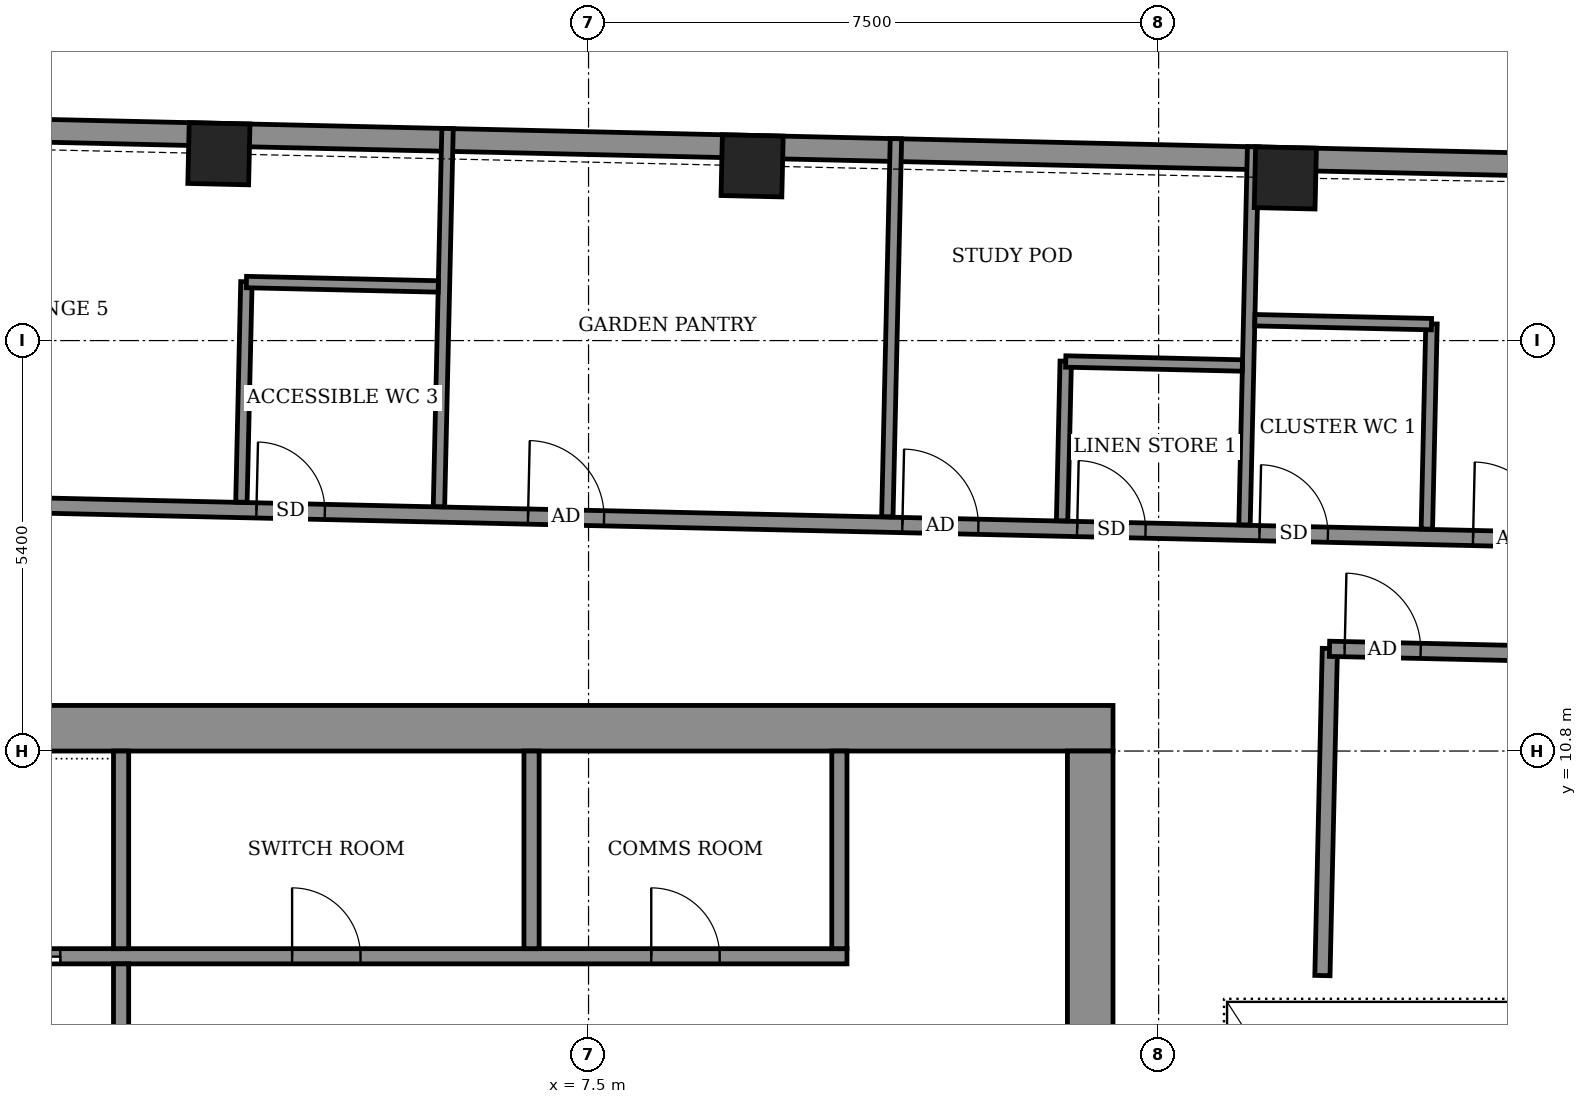
"""IFC4 building model, lengths in metres.
Left out: names, types, materials, properties, quantities, classifications, styles, units other than length and angle.
Written with IfcOpenShell. Run it as: python <this file> out.ifc"""

import sys

from ifc_helpers import new_model, si_unit, direction, frame, frame_2d, origin, origin_2d, place, context, subcontext, project, spatial, rectangle, extrude, element, fill, save


model = new_model("IFC4")
c1 = context("Model", 3, precision=1e-05, world=origin(), true_north=direction((0.0, 1.0)))
c2 = subcontext(c1, "Body", "Model", "MODEL_VIEW")
j1 = project(units=[si_unit("LENGTHUNIT", "METRE"), si_unit("PLANEANGLEUNIT", "RADIAN")], contexts=[c1])
p1 = place(None, origin())
s1 = spatial("IfcSite", under=j1, at=p1, CompositionType="ELEMENT")
p2 = place(p1, origin())
s2 = spatial("IfcBuilding", under=s1, at=p2, CompositionType="ELEMENT")
p3 = place(p2, frame((0.0, 0.0, 350.7)))
s3 = spatial("IfcBuildingStorey", under=s2, at=p3, CompositionType="ELEMENT", Elevation=350.7)
for number, where, z_axis, x_axis in (
    (1, (16.667, 18.34, -0.55), (0.0, 0.0, 1.0), (-1.0, 0.023, 0.0)),
    (2, (9.652, 18.499, -0.55), (0.0, 0.0, 1.0), (-1.0, 0.023, 0.0)),
    (3, (2.637, 18.658, -0.55), (0.0, 0.0, 1.0), (-1.0, 0.023, 0.0)),
):
    element("IfcColumn", number, at=place(p3, frame(where, z_axis=z_axis, x_axis=x_axis)), inside=s3, PredefinedType="COLUMN", context=c2, shape_type="SweptSolid", body=[
        extrude(rectangle(XDim=0.8, YDim=0.8, at=origin_2d()), origin(), (0.0, 0.0, 1.0), 3.6),
    ])
p4 = place(p3, frame((23.537, 18.434, 0.0), z_axis=(0.0, 0.0, 1.0), x_axis=(-0.999742787513, 0.022679480066, 0.0)))
e4 = element("IfcWall", 4, at=p4, inside=s3, PredefinedType="SOLIDWALL", context=c2, shape_type="SweptSolid", body=[
    extrude(rectangle(XDim=41.8, YDim=0.3, at=frame_2d((20.9, 0.0))), origin(), (0.0, 0.0, 1.0), 2.5),
])
p5 = place(p3, frame((17.155, 7.846, 0.0), z_axis=(0.0, 0.0, 1.0), x_axis=(0.022745886685, 0.999741278851, 0.0)))
e5 = element("IfcWall", 5, at=p5, inside=s3, PredefinedType="PARTITIONING", context=c2, shape_type="SweptSolid", body=[
    extrude(rectangle(XDim=4.304, YDim=0.2, at=frame_2d((2.152, 0.0))), origin(), (0.0, 0.0, 1.0), 3.05),
])
p6 = place(p3, frame((17.248, 12.145, 0.0), z_axis=(0.0, 0.0, 1.0), x_axis=(0.999740905536, -0.022762288964, 0.0)))
e6 = element("IfcWall", 6, at=p6, inside=s3, PredefinedType="PARTITIONING", context=c2, shape_type="SweptSolid", body=[
    extrude(rectangle(XDim=4.612, YDim=0.2, at=frame_2d((2.306, 0.0))), origin(), (0.0, 0.0, 1.0), 3.05),
])
p7 = place(p6, frame((0.2, 0.0, 0.0)))
e7 = element("IfcOpeningElement", 7, at=p7, cuts=e6, PredefinedType="OPENING", context=c2, shape_type="SweptSolid", body=[
    extrude(rectangle(XDim=1.0, YDim=2.1, at=frame_2d((0.5, 1.05))), frame((0.0, 0.11, 0.0), z_axis=(0.0, -1.0, 0.0), x_axis=(1.0, 0.0, 0.0)), (0.0, 0.0, 1.0), 0.22),
])
p8 = place(p3, frame((-16.831, 14.419, 0.0), z_axis=(0.0, 0.0, 1.0), x_axis=(0.999742531431, -0.022690765715, 0.0)))
e8 = element("IfcWall", 8, at=p8, inside=s3, PredefinedType="PARTITIONING", context=c2, shape_type="SweptSolid", body=[
    extrude(rectangle(XDim=38.734, YDim=0.2, at=frame_2d((19.367, 0.0))), origin(), (0.0, 0.0, 1.0), 3.05),
])
p9 = place(p8, frame((35.977, 0.0, 0.0)))
e9 = element("IfcOpeningElement", 9, at=p9, cuts=e8, PredefinedType="OPENING", context=c2, shape_type="SweptSolid", body=[
    extrude(rectangle(XDim=1.0, YDim=2.1, at=frame_2d((0.5, 1.05))), frame((0.0, 0.11, 0.0), z_axis=(0.0, -1.0, 0.0), x_axis=(1.0, 0.0, 0.0)), (0.0, 0.0, 1.0), 0.22),
])
p10 = place(p8, frame((33.167, 0.0, 0.0)))
e10 = element("IfcOpeningElement", 10, at=p10, cuts=e8, PredefinedType="OPENING", context=c2, shape_type="SweptSolid", body=[
    extrude(rectangle(XDim=0.9, YDim=2.1, at=frame_2d((0.45, 1.05))), frame((0.0, 0.11, 0.0), z_axis=(0.0, -1.0, 0.0), x_axis=(1.0, 0.0, 0.0)), (0.0, 0.0, 1.0), 0.22),
])
p11 = place(p8, frame((28.467, 0.0, 0.0)))
e11 = element("IfcOpeningElement", 11, at=p11, cuts=e8, PredefinedType="OPENING", context=c2, shape_type="SweptSolid", body=[
    extrude(rectangle(XDim=1.0, YDim=2.1, at=frame_2d((0.5, 1.05))), frame((0.0, 0.11, 0.0), z_axis=(0.0, -1.0, 0.0), x_axis=(1.0, 0.0, 0.0)), (0.0, 0.0, 1.0), 0.22),
])
p12 = place(p8, frame((30.767, 0.0, 0.0)))
e12 = element("IfcOpeningElement", 12, at=p12, cuts=e8, PredefinedType="OPENING", context=c2, shape_type="SweptSolid", body=[
    extrude(rectangle(XDim=0.9, YDim=2.1, at=frame_2d((0.45, 1.05))), frame((0.0, 0.11, 0.0), z_axis=(0.0, -1.0, 0.0), x_axis=(1.0, 0.0, 0.0)), (0.0, 0.0, 1.0), 0.22),
])
p13 = place(p8, frame((23.541, 0.0, 0.0)))
e13 = element("IfcOpeningElement", 13, at=p13, cuts=e8, PredefinedType="OPENING", context=c2, shape_type="SweptSolid", body=[
    extrude(rectangle(XDim=1.0, YDim=2.1, at=frame_2d((0.5, 1.05))), frame((0.0, 0.11, 0.0), z_axis=(0.0, -1.0, 0.0), x_axis=(1.0, 0.0, 0.0)), (0.0, 0.0, 1.0), 0.22),
])
p14 = place(p8, frame((15.828, 0.0, 0.0)))
e14 = element("IfcOpeningElement", 14, at=p14, cuts=e8, PredefinedType="OPENING", context=c2, shape_type="SweptSolid", body=[
    extrude(rectangle(XDim=1.0, YDim=2.1, at=frame_2d((0.5, 1.05))), frame((0.0, 0.11, 0.0), z_axis=(0.0, -1.0, 0.0), x_axis=(1.0, 0.0, 0.0)), (0.0, 0.0, 1.0), 0.22),
])
p15 = place(p8, frame((19.967, 0.0, 0.0)))
e15 = element("IfcOpeningElement", 15, at=p15, cuts=e8, PredefinedType="OPENING", context=c2, shape_type="SweptSolid", body=[
    extrude(rectangle(XDim=0.9, YDim=2.1, at=frame_2d((0.45, 1.05))), frame((0.0, 0.11, 0.0), z_axis=(0.0, -1.0, 0.0), x_axis=(1.0, 0.0, 0.0)), (0.0, 0.0, 1.0), 0.22),
])
p16 = place(p8, frame((9.83, 0.0, 0.0)))
e16 = element("IfcOpeningElement", 16, at=p16, cuts=e8, PredefinedType="OPENING", context=c2, shape_type="SweptSolid", body=[
    extrude(rectangle(XDim=1.0, YDim=2.1, at=frame_2d((0.5, 1.05))), frame((0.0, 0.11, 0.0), z_axis=(0.0, -1.0, 0.0), x_axis=(1.0, 0.0, 0.0)), (0.0, 0.0, 1.0), 0.22),
])
p17 = place(p8, frame((6.817, 0.0, 0.0)))
e17 = element("IfcOpeningElement", 17, at=p17, cuts=e8, PredefinedType="OPENING", context=c2, shape_type="SweptSolid", body=[
    extrude(rectangle(XDim=0.9, YDim=2.1, at=frame_2d((0.45, 1.05))), frame((0.0, 0.11, 0.0), z_axis=(0.0, -1.0, 0.0), x_axis=(1.0, 0.0, 0.0)), (0.0, 0.0, 1.0), 0.22),
])
p18 = place(p8, frame((0.2, 0.0, 0.0)))
e18 = element("IfcOpeningElement", 18, at=p18, cuts=e8, PredefinedType="OPENING", context=c2, shape_type="SweptSolid", body=[
    extrude(rectangle(XDim=1.0, YDim=2.1, at=frame_2d((0.5, 1.05))), frame((0.0, 0.11, 0.0), z_axis=(0.0, -1.0, 0.0), x_axis=(1.0, 0.0, 0.0)), (0.0, 0.0, 1.0), 0.22),
])
p19 = place(p8, frame((4.217, 0.0, 0.0)))
e19 = element("IfcOpeningElement", 19, at=p19, cuts=e8, PredefinedType="OPENING", context=c2, shape_type="SweptSolid", body=[
    extrude(rectangle(XDim=0.9, YDim=2.1, at=frame_2d((0.45, 1.05))), frame((0.0, 0.11, 0.0), z_axis=(0.0, -1.0, 0.0), x_axis=(1.0, 0.0, 0.0)), (0.0, 0.0, 1.0), 0.22),
])
p20 = place(p3, frame((2.933, 14.074, 0.0), z_axis=(0.0, 0.0, 1.0), x_axis=(0.022723317103, 0.999741792094, 0.0)))
e20 = element("IfcWall", 20, at=p20, inside=s3, PredefinedType="PARTITIONING", context=c2, shape_type="SweptSolid", body=[
    extrude(rectangle(XDim=2.901, YDim=0.15, at=frame_2d((1.45, 0.0))), origin(), (0.0, 0.0, 1.0), 3.05),
])
p21 = place(p3, frame((5.532, 14.015, 0.0), z_axis=(0.0, 0.0, 1.0), x_axis=(0.022714718825, 0.999741987489, 0.0)))
e21 = element("IfcWall", 21, at=p21, inside=s3, PredefinedType="PARTITIONING", context=c2, shape_type="SweptSolid", body=[
    extrude(rectangle(XDim=4.976, YDim=0.15, at=frame_2d((2.488, 0.0))), origin(), (0.0, 0.0, 1.0), 2.5),
])
p22 = place(p3, frame((11.431, 13.882, 0.0), z_axis=(0.0, 0.0, 1.0), x_axis=(0.022720290659, 0.999741860878, 0.0)))
e22 = element("IfcWall", 22, at=p22, inside=s3, PredefinedType="PARTITIONING", context=c2, shape_type="SweptSolid", body=[
    extrude(rectangle(XDim=4.975, YDim=0.15, at=frame_2d((2.488, 0.0))), origin(), (0.0, 0.0, 1.0), 2.5),
])
p23 = place(p3, frame((13.73, 13.829, 0.0), z_axis=(0.0, 0.0, 1.0), x_axis=(0.022898307927, 0.999737799372, 0.0)))
e23 = element("IfcWall", 23, at=p23, inside=s3, PredefinedType="PARTITIONING", context=c2, shape_type="SweptSolid", body=[
    extrude(rectangle(XDim=2.1, YDim=0.15, at=frame_2d((1.05, 0.0))), origin(), (0.0, 0.0, 1.0), 3.05),
])
p24 = place(p3, frame((16.13, 13.775, 0.0), z_axis=(0.0, 0.0, 1.0), x_axis=(0.022714718825, 0.999741987489, 0.0)))
e24 = element("IfcWall", 24, at=p24, inside=s3, PredefinedType="PARTITIONING", context=c2, shape_type="SweptSolid", body=[
    extrude(rectangle(XDim=4.976, YDim=0.15, at=frame_2d((2.488, 0.0))), origin(), (0.0, 0.0, 1.0), 2.5),
])
p25 = place(p3, frame((18.529, 13.72, 0.0), z_axis=(0.0, 0.0, 1.0), x_axis=(0.022600248254, 0.99974458177, 0.0)))
e25 = element("IfcWall", 25, at=p25, inside=s3, PredefinedType="PARTITIONING", context=c2, shape_type="SweptSolid", body=[
    extrude(rectangle(XDim=2.701, YDim=0.15, at=frame_2d((1.35, 0.0))), origin(), (0.0, 0.0, 1.0), 3.05),
])
for number, where, z_axis, x_axis in (
    (26, (13.778, 15.925, 0.0), (0.0, 0.0, 1.0), (1.0, -0.023, 0.0)),
    (27, (16.266, 16.468, 0.0), (0.0, 0.0, 1.0), (1.0, -0.022, 0.0)),
):
    element("IfcWall", number, at=place(p3, frame(where, z_axis=z_axis, x_axis=x_axis)), inside=s3, PredefinedType="PARTITIONING", context=c2, shape_type="SweptSolid", body=[
        extrude(rectangle(XDim=2.324, YDim=0.15, at=frame_2d((1.162, 0.0))), origin(), (0.0, 0.0, 1.0), 3.05),
    ])
p26 = place(p3, frame((2.999, 16.97, 0.0), z_axis=(0.0, 0.0, 1.0), x_axis=(0.999737322729, -0.022919108675, 0.0)))
e28 = element("IfcWall", 28, at=p26, inside=s3, PredefinedType="PARTITIONING", context=c2, shape_type="SweptSolid", body=[
    extrude(rectangle(XDim=2.525, YDim=0.15, at=frame_2d((1.262, 0.0))), origin(), (0.0, 0.0, 1.0), 3.05),
])
p27 = place(p3, frame((-14.4, 11.1, 0.0), z_axis=(0.0, 0.0, 1.0), x_axis=(1.0, 0.0, 0.0)))
e29 = element("IfcWall", 29, at=p27, inside=s3, PredefinedType="SHEAR", context=c2, shape_type="SweptSolid", body=[
    extrude(rectangle(XDim=28.8, YDim=0.6, at=frame_2d((14.4, 0.0))), origin(), (0.0, 0.0, 1.0), 3.6),
])
p28 = place(p3, frame((14.1, -10.8, 0.0), z_axis=(0.0, 0.0, 1.0), x_axis=(0.0, 1.0, 0.0)))
e30 = element("IfcWall", 30, at=p28, inside=s3, PredefinedType="SHEAR", context=c2, shape_type="SweptSolid", body=[
    extrude(rectangle(XDim=21.6, YDim=0.6, at=frame_2d((10.8, 0.0))), origin(), (0.0, 0.0, 1.0), 3.6),
])
p29 = place(p28, frame((1.2, 0.0, 0.0)))
e31 = element("IfcOpeningElement", 31, at=p29, cuts=e30, PredefinedType="OPENING", context=c2, shape_type="SweptSolid", body=[
    extrude(rectangle(XDim=1.2, YDim=2.1, at=frame_2d((0.6, 1.05))), frame((0.0, 0.31, 0.0), z_axis=(0.0, -1.0, 0.0), x_axis=(1.0, 0.0, 0.0)), (0.0, 0.0, 1.0), 0.62),
])
p30 = place(p3, frame((-10.9, 8.1, 0.0), z_axis=(0.0, 0.0, 1.0), x_axis=(1.0, 0.0, 0.0)))
e32 = element("IfcWall", 32, at=p30, inside=s3, PredefinedType="SHEAR", context=c2, shape_type="SweptSolid", body=[
    extrude(rectangle(XDim=21.8, YDim=0.2, at=frame_2d((10.9, 0.0))), origin(), (0.0, 0.0, 1.0), 3.05),
])
p31 = place(p30, frame((4.95, 0.0, 0.0)))
e33 = element("IfcOpeningElement", 33, at=p31, cuts=e32, PredefinedType="OPENING", context=c2, shape_type="SweptSolid", body=[
    extrude(rectangle(XDim=1.1, YDim=2.1, at=frame_2d((0.55, 1.05))), frame((0.0, 0.11, 0.0), z_axis=(0.0, -1.0, 0.0), x_axis=(1.0, 0.0, 0.0)), (0.0, 0.0, 1.0), 0.22),
])
p32 = place(p30, frame((7.65, 0.0, 0.0)))
e34 = element("IfcOpeningElement", 34, at=p32, cuts=e32, PredefinedType="OPENING", context=c2, shape_type="SweptSolid", body=[
    extrude(rectangle(XDim=1.1, YDim=2.1, at=frame_2d((0.55, 1.05))), frame((0.0, 0.11, 0.0), z_axis=(0.0, -1.0, 0.0), x_axis=(1.0, 0.0, 0.0)), (0.0, 0.0, 1.0), 0.22),
])
p33 = place(p30, frame((10.35, 0.0, 0.0)))
e35 = element("IfcOpeningElement", 35, at=p33, cuts=e32, PredefinedType="OPENING", context=c2, shape_type="SweptSolid", body=[
    extrude(rectangle(XDim=1.1, YDim=2.1, at=frame_2d((0.55, 1.05))), frame((0.0, 0.11, 0.0), z_axis=(0.0, -1.0, 0.0), x_axis=(1.0, 0.0, 0.0)), (0.0, 0.0, 1.0), 0.22),
])
p34 = place(p30, frame((1.675, 0.0, 0.0)))
e36 = element("IfcOpeningElement", 36, at=p34, cuts=e32, PredefinedType="OPENING", context=c2, shape_type="SweptSolid", body=[
    extrude(rectangle(XDim=0.9, YDim=2.1, at=frame_2d((0.45, 1.05))), frame((0.0, 0.11, 0.0), z_axis=(0.0, -1.0, 0.0), x_axis=(1.0, 0.0, 0.0)), (0.0, 0.0, 1.0), 0.22),
])
p35 = place(p30, frame((14.5, 0.0, 0.0)))
e37 = element("IfcOpeningElement", 37, at=p35, cuts=e32, PredefinedType="OPENING", context=c2, shape_type="SweptSolid", body=[
    extrude(rectangle(XDim=0.9, YDim=2.1, at=frame_2d((0.45, 1.05))), frame((0.0, 0.11, 0.0), z_axis=(0.0, -1.0, 0.0), x_axis=(1.0, 0.0, 0.0)), (0.0, 0.0, 1.0), 0.22),
])
p36 = place(p30, frame((19.225, 0.0, 0.0)))
e38 = element("IfcOpeningElement", 38, at=p36, cuts=e32, PredefinedType="OPENING", context=c2, shape_type="SweptSolid", body=[
    extrude(rectangle(XDim=0.9, YDim=2.1, at=frame_2d((0.45, 1.05))), frame((0.0, 0.11, 0.0), z_axis=(0.0, -1.0, 0.0), x_axis=(1.0, 0.0, 0.0)), (0.0, 0.0, 1.0), 0.22),
])
p37 = place(p3, frame((1.35, 8.2, 0.0), z_axis=(0.0, 0.0, 1.0), x_axis=(0.0, 1.0, 0.0)))
e39 = element("IfcWall", 39, at=p37, inside=s3, PredefinedType="SHEAR", context=c2, shape_type="SweptSolid", body=[
    extrude(rectangle(XDim=2.6, YDim=0.2, at=frame_2d((1.3, 0.0))), origin(), (0.0, 0.0, 1.0), 3.05),
])
for number, where, z_axis, x_axis in (
    (40, (6.75, 8.2, 0.0), (0.0, 0.0, 1.0), (0.0, 1.0, 0.0)),
    (41, (10.8, 8.2, 0.0), (0.0, 0.0, 1.0), (0.0, 1.0, 0.0)),
):
    element("IfcWall", number, at=place(p3, frame(where, z_axis=z_axis, x_axis=x_axis)), inside=s3, PredefinedType="STANDARD", context=c2, shape_type="SweptSolid", body=[
        extrude(rectangle(XDim=2.6, YDim=0.2, at=frame_2d((1.3, 0.0))), origin(), (0.0, 0.0, 1.0), 3.05),
    ])
p38 = place(p3, frame((1.35, 2.1, 0.0), z_axis=(0.0, 0.0, 1.0), x_axis=(0.0, 1.0, 0.0)))
e42 = element("IfcWall", 42, at=p38, inside=s3, PredefinedType="STANDARD", context=c2, shape_type="SweptSolid", body=[
    extrude(rectangle(XDim=5.9, YDim=0.2, at=frame_2d((2.95, 0.0))), origin(), (0.0, 0.0, 1.0), 3.05),
])
p39 = place(p38, frame((2.35, 0.0, 0.0)))
e43 = element("IfcOpeningElement", 43, at=p39, cuts=e42, PredefinedType="OPENING", context=c2, shape_type="SweptSolid", body=[
    extrude(rectangle(XDim=1.2, YDim=2.1, at=frame_2d((0.6, 1.05))), frame((0.0, 0.11, 0.0), z_axis=(0.0, -1.0, 0.0), x_axis=(1.0, 0.0, 0.0)), (0.0, 0.0, 1.0), 0.22),
])
p40 = place(p2, frame((0.0, 0.0, 354.3)))
p41 = place(p40, frame((0.0, 0.0, -0.55)))
p42 = place(p41, frame((20.762, 0.0, 0.0)))
p43 = place(p42, frame((0.0, 0.0, 0.5)))
e44 = element("IfcWindow", 44, at=p43, inside=s3, PartitioningType="SINGLE_PANEL", PredefinedType="SKYLIGHT", context=c2, shape_type="SweptSolid", body=[
    extrude(rectangle(XDim=9.723, YDim=15.0, at=origin_2d()), origin(), (0.0, 0.0, 1.0), 0.05),
])
p44 = place(p7, origin())
e45 = element("IfcDoor", 45, at=p44, inside=s3, OperationType="SINGLE_SWING_LEFT", PredefinedType="DOOR", context=c2, shape_type="SweptSolid", body=[
    extrude(rectangle(XDim=1.0, YDim=2.1, at=frame_2d((0.5, 1.05))), frame((0.0, 0.025, 0.0), z_axis=(0.0, -1.0, 0.0), x_axis=(1.0, 0.0, 0.0)), (0.0, 0.0, 1.0), 0.05),
])
fill(e7, e45)
p45 = place(p9, origin())
e46 = element("IfcDoor", 46, at=p45, inside=s3, OperationType="SINGLE_SWING_RIGHT", PredefinedType="DOOR", context=c2, shape_type="SweptSolid", body=[
    extrude(rectangle(XDim=1.0, YDim=2.1, at=frame_2d((0.5, 1.05))), frame((0.0, 0.025, 0.0), z_axis=(0.0, -1.0, 0.0), x_axis=(1.0, 0.0, 0.0)), (0.0, 0.0, 1.0), 0.05),
])
fill(e9, e46)
p46 = place(p10, origin())
e47 = element("IfcDoor", 47, at=p46, inside=s3, OperationType="SINGLE_SWING_LEFT", PredefinedType="DOOR", context=c2, shape_type="SweptSolid", body=[
    extrude(rectangle(XDim=0.9, YDim=2.1, at=frame_2d((0.45, 1.05))), frame((0.0, 0.025, 0.0), z_axis=(0.0, -1.0, 0.0), x_axis=(1.0, 0.0, 0.0)), (0.0, 0.0, 1.0), 0.05),
])
fill(e10, e47)
p47 = place(p11, origin())
e48 = element("IfcDoor", 48, at=p47, inside=s3, OperationType="SINGLE_SWING_LEFT", PredefinedType="DOOR", context=c2, shape_type="SweptSolid", body=[
    extrude(rectangle(XDim=1.0, YDim=2.1, at=frame_2d((0.5, 1.05))), frame((0.0, 0.025, 0.0), z_axis=(0.0, -1.0, 0.0), x_axis=(1.0, 0.0, 0.0)), (0.0, 0.0, 1.0), 0.05),
])
fill(e11, e48)
p48 = place(p12, origin())
e49 = element("IfcDoor", 49, at=p48, inside=s3, OperationType="SINGLE_SWING_RIGHT", PredefinedType="DOOR", context=c2, shape_type="SweptSolid", body=[
    extrude(rectangle(XDim=0.9, YDim=2.1, at=frame_2d((0.45, 1.05))), frame((0.0, 0.025, 0.0), z_axis=(0.0, -1.0, 0.0), x_axis=(1.0, 0.0, 0.0)), (0.0, 0.0, 1.0), 0.05),
])
fill(e12, e49)
p49 = place(p13, origin())
e50 = element("IfcDoor", 50, at=p49, inside=s3, OperationType="SINGLE_SWING_RIGHT", PredefinedType="DOOR", context=c2, shape_type="SweptSolid", body=[
    extrude(rectangle(XDim=1.0, YDim=2.1, at=frame_2d((0.5, 1.05))), frame((0.0, 0.025, 0.0), z_axis=(0.0, -1.0, 0.0), x_axis=(1.0, 0.0, 0.0)), (0.0, 0.0, 1.0), 0.05),
])
fill(e13, e50)
p50 = place(p15, origin())
e51 = element("IfcDoor", 51, at=p50, inside=s3, OperationType="SINGLE_SWING_LEFT", PredefinedType="DOOR", context=c2, shape_type="SweptSolid", body=[
    extrude(rectangle(XDim=0.9, YDim=2.1, at=frame_2d((0.45, 1.05))), frame((0.0, 0.025, 0.0), z_axis=(0.0, -1.0, 0.0), x_axis=(1.0, 0.0, 0.0)), (0.0, 0.0, 1.0), 0.05),
])
fill(e15, e51)
p51 = place(p33, origin())
e52 = element("IfcDoor", 52, at=p51, inside=s3, OperationType="SLIDING_TO_LEFT", PredefinedType="DOOR", context=c2, shape_type="SweptSolid", body=[
    extrude(rectangle(XDim=1.1, YDim=2.1, at=frame_2d((0.55, 1.05))), frame((0.0, 0.025, 0.0), z_axis=(0.0, -1.0, 0.0), x_axis=(1.0, 0.0, 0.0)), (0.0, 0.0, 1.0), 0.05),
])
fill(e35, e52)
p52 = place(p35, origin())
e53 = element("IfcDoor", 53, at=p52, inside=s3, OperationType="SINGLE_SWING_LEFT", PredefinedType="DOOR", context=c2, shape_type="SweptSolid", body=[
    extrude(rectangle(XDim=0.9, YDim=2.1, at=frame_2d((0.45, 1.05))), frame((0.0, 0.025, 0.0), z_axis=(0.0, -1.0, 0.0), x_axis=(1.0, 0.0, 0.0)), (0.0, 0.0, 1.0), 0.05),
])
fill(e37, e53)
p53 = place(p36, origin())
e54 = element("IfcDoor", 54, at=p53, inside=s3, OperationType="SINGLE_SWING_LEFT", PredefinedType="DOOR", context=c2, shape_type="SweptSolid", body=[
    extrude(rectangle(XDim=0.9, YDim=2.1, at=frame_2d((0.45, 1.05))), frame((0.0, 0.025, 0.0), z_axis=(0.0, -1.0, 0.0), x_axis=(1.0, 0.0, 0.0)), (0.0, 0.0, 1.0), 0.05),
])
fill(e38, e54)
save(model, sys.argv[1])
